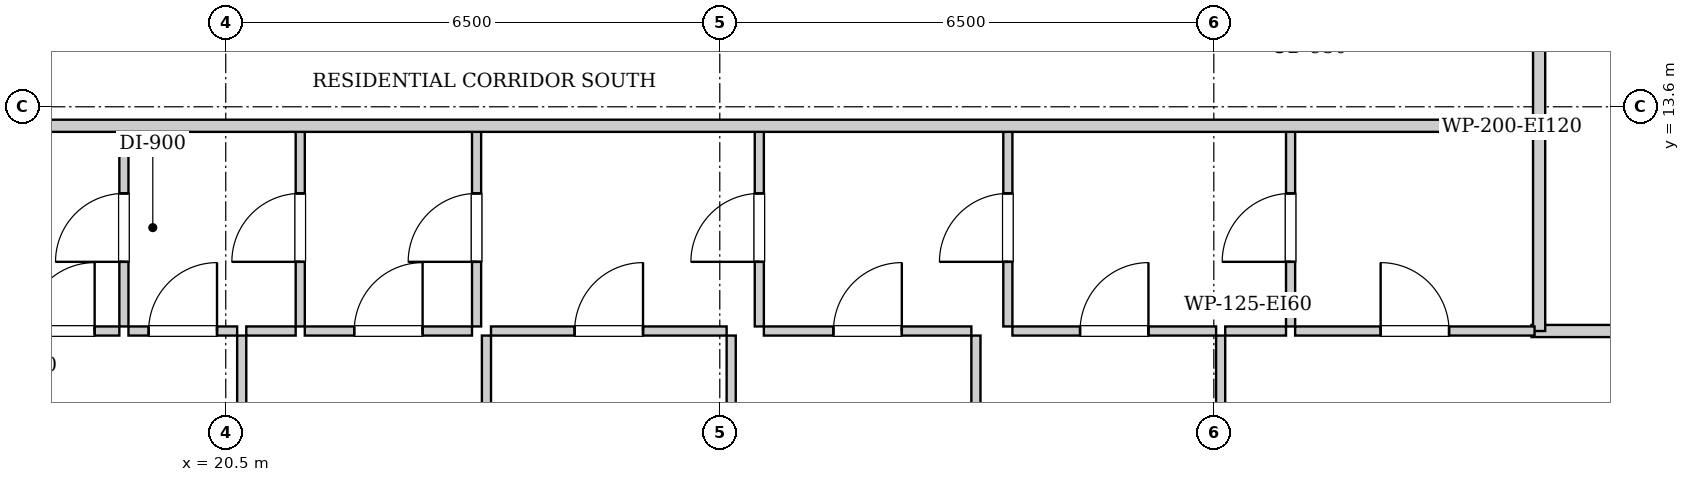
"""IFC4 building model, lengths in metres.
Left out: names, types, materials, properties, quantities, classifications, styles, units other than length and angle.
Written with IfcOpenShell. Run it as: python <this file> out.ifc"""

import sys

from ifc_helpers import new_model, si_unit, direction, frame, frame_2d, origin, place, context, subcontext, project, spatial, rectangle, extrude, element, fill, save


model = new_model("IFC4")
c1 = context("Model", 3, precision=1e-05, world=origin(), true_north=direction((0.0, 1.0)))
c2 = subcontext(c1, "Body", "Model", "MODEL_VIEW")
j1 = project(units=[si_unit("LENGTHUNIT", "METRE"), si_unit("PLANEANGLEUNIT", "RADIAN")], contexts=[c1])
p1 = place(None, origin())
s1 = spatial("IfcSite", under=j1, at=p1, CompositionType="ELEMENT")
p2 = place(p1, origin())
s2 = spatial("IfcBuilding", under=s1, at=p2, CompositionType="ELEMENT")
p3 = place(p2, frame((0.0, 0.0, 130.9)))
s3 = spatial("IfcBuildingStorey", under=s2, at=p3, CompositionType="ELEMENT", Elevation=130.9)
p4 = place(p3, frame((37.78, 13.35, 0.0), z_axis=(0.0, 0.0, 1.0), x_axis=(0.0, 1.0, 0.0)))
e1 = element("IfcWall", 1, at=p4, inside=s3, PredefinedType="PARTITIONING", context=c2, shape_type="SweptSolid", body=[
    extrude(rectangle(XDim=1.74, YDim=0.16, at=frame_2d((0.87, 0.0))), origin(), (0.0, 0.0, 1.0), 2.99),
])
p5 = place(p3, frame((37.68, 10.65, 0.0), z_axis=(0.0, 0.0, 1.0), x_axis=(1.0, 0.0, 0.0)))
e2 = element("IfcWall", 2, at=p5, inside=s3, PredefinedType="PARTITIONING", context=c2, shape_type="SweptSolid", body=[
    extrude(rectangle(XDim=2.34, YDim=0.16, at=frame_2d((1.17, 0.0))), origin(), (0.0, 0.0, 1.0), 2.99),
])
p6 = place(p3, frame((37.78, 10.65, 0.0), z_axis=(0.0, 0.0, 1.0), x_axis=(0.0, 1.0, 0.0)))
e3 = element("IfcWall", 3, at=p6, inside=s3, PredefinedType="PARTITIONING", context=c2, shape_type="SweptSolid", body=[
    extrude(rectangle(XDim=2.66, YDim=0.16, at=frame_2d((1.33, 0.0))), origin(), (0.0, 0.0, 1.0), 2.99),
])
p7 = place(p3, frame((19.16, 10.71, 0.0), z_axis=(0.0, 0.0, 1.0), x_axis=(0.0, 1.0, 0.0)))
e4 = element("IfcWall", 4, at=p7, inside=s3, PredefinedType="PARTITIONING", context=c2, shape_type="SweptSolid", body=[
    extrude(rectangle(XDim=2.6, YDim=0.12, at=frame_2d((1.3, 0.0))), origin(), (0.0, 0.0, 1.0), 2.99),
])
p8 = place(p7, frame((0.85, 0.0, 0.0)))
e5 = element("IfcOpeningElement", 5, at=p8, cuts=e4, PredefinedType="OPENING", context=c2, shape_type="SweptSolid", body=[
    extrude(rectangle(XDim=0.9, YDim=2.05, at=frame_2d((0.45, 1.025))), frame((0.0, 0.07, 0.0), z_axis=(0.0, -1.0, 0.0), x_axis=(1.0, 0.0, 0.0)), (0.0, 0.0, 1.0), 0.14),
])
p9 = place(p3, frame((17.55, 10.65, 0.0), z_axis=(0.0, 0.0, 1.0), x_axis=(1.0, 0.0, 0.0)))
e6 = element("IfcWall", 6, at=p9, inside=s3, PredefinedType="PARTITIONING", context=c2, shape_type="SweptSolid", body=[
    extrude(rectangle(XDim=1.55, YDim=0.12, at=frame_2d((0.775, 0.0))), origin(), (0.0, 0.0, 1.0), 2.99),
])
p10 = place(p9, frame((0.325, 0.0, 0.0)))
e7 = element("IfcOpeningElement", 7, at=p10, cuts=e6, PredefinedType="OPENING", context=c2, shape_type="SweptSolid", body=[
    extrude(rectangle(XDim=0.9, YDim=2.05, at=frame_2d((0.45, 1.025))), frame((0.0, 0.07, 0.0), z_axis=(0.0, -1.0, 0.0), x_axis=(1.0, 0.0, 0.0)), (0.0, 0.0, 1.0), 0.14),
])
p11 = place(p3, frame((21.48, 10.71, 0.0), z_axis=(0.0, 0.0, 1.0), x_axis=(0.0, 1.0, 0.0)))
e8 = element("IfcWall", 8, at=p11, inside=s3, PredefinedType="PARTITIONING", context=c2, shape_type="SweptSolid", body=[
    extrude(rectangle(XDim=2.6, YDim=0.12, at=frame_2d((1.3, 0.0))), origin(), (0.0, 0.0, 1.0), 2.99),
])
p12 = place(p11, frame((0.85, 0.0, 0.0)))
e9 = element("IfcOpeningElement", 9, at=p12, cuts=e8, PredefinedType="OPENING", context=c2, shape_type="SweptSolid", body=[
    extrude(rectangle(XDim=0.9, YDim=2.05, at=frame_2d((0.45, 1.025))), frame((0.0, 0.07, 0.0), z_axis=(0.0, -1.0, 0.0), x_axis=(1.0, 0.0, 0.0)), (0.0, 0.0, 1.0), 0.14),
])
p13 = place(p3, frame((19.22, 10.65, 0.0), z_axis=(0.0, 0.0, 1.0), x_axis=(1.0, 0.0, 0.0)))
e10 = element("IfcWall", 10, at=p13, inside=s3, PredefinedType="PARTITIONING", context=c2, shape_type="SweptSolid", body=[
    extrude(rectangle(XDim=1.43, YDim=0.12, at=frame_2d((0.715, 0.0))), origin(), (0.0, 0.0, 1.0), 2.99),
])
p14 = place(p13, frame((0.265, 0.0, 0.0)))
e11 = element("IfcOpeningElement", 11, at=p14, cuts=e10, PredefinedType="OPENING", context=c2, shape_type="SweptSolid", body=[
    extrude(rectangle(XDim=0.9, YDim=2.05, at=frame_2d((0.45, 1.025))), frame((0.0, 0.07, 0.0), z_axis=(0.0, -1.0, 0.0), x_axis=(1.0, 0.0, 0.0)), (0.0, 0.0, 1.0), 0.14),
])
p15 = place(p3, frame((20.77, 10.65, 0.0), z_axis=(0.0, 0.0, 1.0), x_axis=(1.0, 0.0, 0.0)))
e12 = element("IfcWall", 12, at=p15, inside=s3, PredefinedType="PARTITIONING", context=c2, shape_type="SweptSolid", body=[
    extrude(rectangle(XDim=0.65, YDim=0.12, at=frame_2d((0.325, 0.0))), origin(), (0.0, 0.0, 1.0), 2.99),
])
p16 = place(p3, frame((23.8, 10.71, 0.0), z_axis=(0.0, 0.0, 1.0), x_axis=(0.0, 1.0, 0.0)))
e13 = element("IfcWall", 13, at=p16, inside=s3, PredefinedType="PARTITIONING", context=c2, shape_type="SweptSolid", body=[
    extrude(rectangle(XDim=2.6, YDim=0.12, at=frame_2d((1.3, 0.0))), origin(), (0.0, 0.0, 1.0), 2.99),
])
p17 = place(p16, frame((0.85, 0.0, 0.0)))
e14 = element("IfcOpeningElement", 14, at=p17, cuts=e13, PredefinedType="OPENING", context=c2, shape_type="SweptSolid", body=[
    extrude(rectangle(XDim=0.9, YDim=2.05, at=frame_2d((0.45, 1.025))), frame((0.0, 0.07, 0.0), z_axis=(0.0, -1.0, 0.0), x_axis=(1.0, 0.0, 0.0)), (0.0, 0.0, 1.0), 0.14),
])
p18 = place(p3, frame((21.54, 10.65, 0.0), z_axis=(0.0, 0.0, 1.0), x_axis=(1.0, 0.0, 0.0)))
e15 = element("IfcWall", 15, at=p18, inside=s3, PredefinedType="PARTITIONING", context=c2, shape_type="SweptSolid", body=[
    extrude(rectangle(XDim=2.2, YDim=0.12, at=frame_2d((1.1, 0.0))), origin(), (0.0, 0.0, 1.0), 2.99),
])
p19 = place(p18, frame((0.65, 0.0, 0.0)))
e16 = element("IfcOpeningElement", 16, at=p19, cuts=e15, PredefinedType="OPENING", context=c2, shape_type="SweptSolid", body=[
    extrude(rectangle(XDim=0.9, YDim=2.05, at=frame_2d((0.45, 1.025))), frame((0.0, 0.07, 0.0), z_axis=(0.0, -1.0, 0.0), x_axis=(1.0, 0.0, 0.0)), (0.0, 0.0, 1.0), 0.14),
])
p20 = place(p3, frame((27.52, 10.71, 0.0), z_axis=(0.0, 0.0, 1.0), x_axis=(0.0, 1.0, 0.0)))
e17 = element("IfcWall", 17, at=p20, inside=s3, PredefinedType="PARTITIONING", context=c2, shape_type="SweptSolid", body=[
    extrude(rectangle(XDim=2.6, YDim=0.12, at=frame_2d((1.3, 0.0))), origin(), (0.0, 0.0, 1.0), 2.99),
])
p21 = place(p20, frame((0.85, 0.0, 0.0)))
e18 = element("IfcOpeningElement", 18, at=p21, cuts=e17, PredefinedType="OPENING", context=c2, shape_type="SweptSolid", body=[
    extrude(rectangle(XDim=0.9, YDim=2.05, at=frame_2d((0.45, 1.025))), frame((0.0, 0.07, 0.0), z_axis=(0.0, -1.0, 0.0), x_axis=(1.0, 0.0, 0.0)), (0.0, 0.0, 1.0), 0.14),
])
p22 = place(p3, frame((23.99, 10.65, 0.0), z_axis=(0.0, 0.0, 1.0), x_axis=(1.0, 0.0, 0.0)))
e19 = element("IfcWall", 19, at=p22, inside=s3, PredefinedType="PARTITIONING", context=c2, shape_type="SweptSolid", body=[
    extrude(rectangle(XDim=3.1, YDim=0.12, at=frame_2d((1.55, 0.0))), origin(), (0.0, 0.0, 1.0), 2.99),
])
p23 = place(p22, frame((1.1, 0.0, 0.0)))
e20 = element("IfcOpeningElement", 20, at=p23, cuts=e19, PredefinedType="OPENING", context=c2, shape_type="SweptSolid", body=[
    extrude(rectangle(XDim=0.9, YDim=2.05, at=frame_2d((0.45, 1.025))), frame((0.0, 0.07, 0.0), z_axis=(0.0, -1.0, 0.0), x_axis=(1.0, 0.0, 0.0)), (0.0, 0.0, 1.0), 0.14),
])
p24 = place(p3, frame((30.79, 10.71, 0.0), z_axis=(0.0, 0.0, 1.0), x_axis=(0.0, 1.0, 0.0)))
e21 = element("IfcWall", 21, at=p24, inside=s3, PredefinedType="PARTITIONING", context=c2, shape_type="SweptSolid", body=[
    extrude(rectangle(XDim=2.6, YDim=0.12, at=frame_2d((1.3, 0.0))), origin(), (0.0, 0.0, 1.0), 2.99),
])
p25 = place(p24, frame((0.85, 0.0, 0.0)))
e22 = element("IfcOpeningElement", 22, at=p25, cuts=e21, PredefinedType="OPENING", context=c2, shape_type="SweptSolid", body=[
    extrude(rectangle(XDim=0.9, YDim=2.05, at=frame_2d((0.45, 1.025))), frame((0.0, 0.07, 0.0), z_axis=(0.0, -1.0, 0.0), x_axis=(1.0, 0.0, 0.0)), (0.0, 0.0, 1.0), 0.14),
])
p26 = place(p3, frame((27.58, 10.65, 0.0), z_axis=(0.0, 0.0, 1.0), x_axis=(1.0, 0.0, 0.0)))
e23 = element("IfcWall", 23, at=p26, inside=s3, PredefinedType="PARTITIONING", context=c2, shape_type="SweptSolid", body=[
    extrude(rectangle(XDim=2.73, YDim=0.12, at=frame_2d((1.365, 0.0))), origin(), (0.0, 0.0, 1.0), 2.99),
])
p27 = place(p26, frame((0.915, 0.0, 0.0)))
e24 = element("IfcOpeningElement", 24, at=p27, cuts=e23, PredefinedType="OPENING", context=c2, shape_type="SweptSolid", body=[
    extrude(rectangle(XDim=0.9, YDim=2.05, at=frame_2d((0.45, 1.025))), frame((0.0, 0.07, 0.0), z_axis=(0.0, -1.0, 0.0), x_axis=(1.0, 0.0, 0.0)), (0.0, 0.0, 1.0), 0.14),
])
p28 = place(p3, frame((34.51, 10.71, 0.0), z_axis=(0.0, 0.0, 1.0), x_axis=(0.0, 1.0, 0.0)))
e25 = element("IfcWall", 25, at=p28, inside=s3, PredefinedType="PARTITIONING", context=c2, shape_type="SweptSolid", body=[
    extrude(rectangle(XDim=2.6, YDim=0.12, at=frame_2d((1.3, 0.0))), origin(), (0.0, 0.0, 1.0), 2.99),
])
p29 = place(p28, frame((0.85, 0.0, 0.0)))
e26 = element("IfcOpeningElement", 26, at=p29, cuts=e25, PredefinedType="OPENING", context=c2, shape_type="SweptSolid", body=[
    extrude(rectangle(XDim=0.9, YDim=2.05, at=frame_2d((0.45, 1.025))), frame((0.0, 0.07, 0.0), z_axis=(0.0, -1.0, 0.0), x_axis=(1.0, 0.0, 0.0)), (0.0, 0.0, 1.0), 0.14),
])
p30 = place(p3, frame((30.85, 10.65, 0.0), z_axis=(0.0, 0.0, 1.0), x_axis=(1.0, 0.0, 0.0)))
e27 = element("IfcWall", 27, at=p30, inside=s3, PredefinedType="PARTITIONING", context=c2, shape_type="SweptSolid", body=[
    extrude(rectangle(XDim=2.68, YDim=0.12, at=frame_2d((1.34, 0.0))), origin(), (0.0, 0.0, 1.0), 2.99),
])
p31 = place(p30, frame((0.89, 0.0, 0.0)))
e28 = element("IfcOpeningElement", 28, at=p31, cuts=e27, PredefinedType="OPENING", context=c2, shape_type="SweptSolid", body=[
    extrude(rectangle(XDim=0.9, YDim=2.05, at=frame_2d((0.45, 1.025))), frame((0.0, 0.07, 0.0), z_axis=(0.0, -1.0, 0.0), x_axis=(1.0, 0.0, 0.0)), (0.0, 0.0, 1.0), 0.14),
])
p32 = place(p3, frame((33.65, 10.65, 0.0), z_axis=(0.0, 0.0, 1.0), x_axis=(1.0, 0.0, 0.0)))
e29 = element("IfcWall", 29, at=p32, inside=s3, PredefinedType="PARTITIONING", context=c2, shape_type="SweptSolid", body=[
    extrude(rectangle(XDim=0.8, YDim=0.12, at=frame_2d((0.4, 0.0))), origin(), (0.0, 0.0, 1.0), 2.99),
])
p33 = place(p3, frame((34.57, 10.65, 0.0), z_axis=(0.0, 0.0, 1.0), x_axis=(1.0, 0.0, 0.0)))
e30 = element("IfcWall", 30, at=p33, inside=s3, PredefinedType="PARTITIONING", context=c2, shape_type="SweptSolid", body=[
    extrude(rectangle(XDim=3.15, YDim=0.12, at=frame_2d((1.575, 0.0))), origin(), (0.0, 0.0, 1.0), 2.99),
])
p34 = place(p33, frame((1.125, 0.0, 0.0)))
e31 = element("IfcOpeningElement", 31, at=p34, cuts=e30, PredefinedType="OPENING", context=c2, shape_type="SweptSolid", body=[
    extrude(rectangle(XDim=0.9, YDim=2.05, at=frame_2d((0.45, 1.025))), frame((0.0, 0.07, 0.0), z_axis=(0.0, -1.0, 0.0), x_axis=(1.0, 0.0, 0.0)), (0.0, 0.0, 1.0), 0.14),
])
p35 = place(p3, frame((20.71, 4.08, 0.0), z_axis=(0.0, 0.0, 1.0), x_axis=(0.0, 1.0, 0.0)))
e32 = element("IfcWall", 32, at=p35, inside=s3, PredefinedType="PARTITIONING", context=c2, shape_type="SweptSolid", body=[
    extrude(rectangle(XDim=6.51, YDim=0.12, at=frame_2d((3.255, 0.0))), origin(), (0.0, 0.0, 1.0), 2.99),
])
p36 = place(p35, frame((2.79, 0.0, 0.0)))
e33 = element("IfcOpeningElement", 33, at=p36, cuts=e32, PredefinedType="OPENING", context=c2, shape_type="SweptSolid", body=[
    extrude(rectangle(XDim=0.9, YDim=2.05, at=frame_2d((0.45, 1.025))), frame((0.0, 0.07, 0.0), z_axis=(0.0, -1.0, 0.0), x_axis=(1.0, 0.0, 0.0)), (0.0, 0.0, 1.0), 0.14),
])
p37 = place(p3, frame((23.93, 4.08, 0.0), z_axis=(0.0, 0.0, 1.0), x_axis=(0.0, 1.0, 0.0)))
e34 = element("IfcWall", 34, at=p37, inside=s3, PredefinedType="PARTITIONING", context=c2, shape_type="SweptSolid", body=[
    extrude(rectangle(XDim=6.51, YDim=0.12, at=frame_2d((3.255, 0.0))), origin(), (0.0, 0.0, 1.0), 2.99),
])
p38 = place(p37, frame((2.79, 0.0, 0.0)))
e35 = element("IfcOpeningElement", 35, at=p38, cuts=e34, PredefinedType="OPENING", context=c2, shape_type="SweptSolid", body=[
    extrude(rectangle(XDim=0.9, YDim=2.05, at=frame_2d((0.45, 1.025))), frame((0.0, 0.07, 0.0), z_axis=(0.0, -1.0, 0.0), x_axis=(1.0, 0.0, 0.0)), (0.0, 0.0, 1.0), 0.14),
])
p39 = place(p3, frame((27.15, 4.08, 0.0), z_axis=(0.0, 0.0, 1.0), x_axis=(0.0, 1.0, 0.0)))
e36 = element("IfcWall", 36, at=p39, inside=s3, PredefinedType="PARTITIONING", context=c2, shape_type="SweptSolid", body=[
    extrude(rectangle(XDim=6.51, YDim=0.12, at=frame_2d((3.255, 0.0))), origin(), (0.0, 0.0, 1.0), 2.99),
])
p40 = place(p39, frame((2.79, 0.0, 0.0)))
e37 = element("IfcOpeningElement", 37, at=p40, cuts=e36, PredefinedType="OPENING", context=c2, shape_type="SweptSolid", body=[
    extrude(rectangle(XDim=0.9, YDim=2.05, at=frame_2d((0.45, 1.025))), frame((0.0, 0.07, 0.0), z_axis=(0.0, -1.0, 0.0), x_axis=(1.0, 0.0, 0.0)), (0.0, 0.0, 1.0), 0.14),
])
p41 = place(p3, frame((30.37, 4.08, 0.0), z_axis=(0.0, 0.0, 1.0), x_axis=(0.0, 1.0, 0.0)))
e38 = element("IfcWall", 38, at=p41, inside=s3, PredefinedType="PARTITIONING", context=c2, shape_type="SweptSolid", body=[
    extrude(rectangle(XDim=6.51, YDim=0.12, at=frame_2d((3.255, 0.0))), origin(), (0.0, 0.0, 1.0), 2.99),
])
p42 = place(p41, frame((2.79, 0.0, 0.0)))
e39 = element("IfcOpeningElement", 39, at=p42, cuts=e38, PredefinedType="OPENING", context=c2, shape_type="SweptSolid", body=[
    extrude(rectangle(XDim=0.9, YDim=2.05, at=frame_2d((0.45, 1.025))), frame((0.0, 0.07, 0.0), z_axis=(0.0, -1.0, 0.0), x_axis=(1.0, 0.0, 0.0)), (0.0, 0.0, 1.0), 0.14),
])
p43 = place(p3, frame((33.59, 6.23, 0.0), z_axis=(0.0, 0.0, 1.0), x_axis=(0.0, 1.0, 0.0)))
e40 = element("IfcWall", 40, at=p43, inside=s3, PredefinedType="PARTITIONING", context=c2, shape_type="SweptSolid", body=[
    extrude(rectangle(XDim=4.36, YDim=0.12, at=frame_2d((2.18, 0.0))), origin(), (0.0, 0.0, 1.0), 2.99),
])
p44 = place(p43, frame((1.73, 0.0, 0.0)))
e41 = element("IfcOpeningElement", 41, at=p44, cuts=e40, PredefinedType="OPENING", context=c2, shape_type="SweptSolid", body=[
    extrude(rectangle(XDim=0.9, YDim=2.05, at=frame_2d((0.45, 1.025))), frame((0.0, 0.07, 0.0), z_axis=(0.0, -1.0, 0.0), x_axis=(1.0, 0.0, 0.0)), (0.0, 0.0, 1.0), 0.14),
])
p45 = place(p3, frame((10.05, 13.35, 0.0), z_axis=(0.0, 0.0, 1.0), x_axis=(1.0, 0.0, 0.0)))
e42 = element("IfcWall", 42, at=p45, inside=s3, PredefinedType="PARTITIONING", context=c2, shape_type="SweptSolid", body=[
    extrude(rectangle(XDim=27.7, YDim=0.16, at=frame_2d((13.85, 0.0))), origin(), (0.0, 0.0, 1.0), 2.99),
])
p46 = place(p45, frame((4.165, 0.0, 0.0)))
e43 = element("IfcOpeningElement", 43, at=p46, cuts=e42, PredefinedType="OPENING", context=c2, shape_type="SweptSolid", body=[
    extrude(rectangle(XDim=0.95, YDim=2.1, at=frame_2d((0.475, 1.05))), frame((0.0, 0.09, 0.0), z_axis=(0.0, -1.0, 0.0), x_axis=(1.0, 0.0, 0.0)), (0.0, 0.0, 1.0), 0.18),
])
p47 = place(p8, origin())
e44 = element("IfcDoor", 44, at=p47, inside=s3, OperationType="SINGLE_SWING_LEFT", PredefinedType="DOOR", context=c2, shape_type="SweptSolid", body=[
    extrude(rectangle(XDim=0.9, YDim=2.05, at=frame_2d((0.45, 1.025))), frame((0.0, 0.025, 0.0), z_axis=(0.0, -1.0, 0.0), x_axis=(1.0, 0.0, 0.0)), (0.0, 0.0, 1.0), 0.05),
])
fill(e5, e44)
p48 = place(p10, origin())
e45 = element("IfcDoor", 45, at=p48, inside=s3, OperationType="SINGLE_SWING_RIGHT", PredefinedType="DOOR", context=c2, shape_type="SweptSolid", body=[
    extrude(rectangle(XDim=0.9, YDim=2.05, at=frame_2d((0.45, 1.025))), frame((0.0, 0.025, 0.0), z_axis=(0.0, -1.0, 0.0), x_axis=(1.0, 0.0, 0.0)), (0.0, 0.0, 1.0), 0.05),
])
fill(e7, e45)
p49 = place(p12, origin())
e46 = element("IfcDoor", 46, at=p49, inside=s3, OperationType="SINGLE_SWING_LEFT", PredefinedType="DOOR", context=c2, shape_type="SweptSolid", body=[
    extrude(rectangle(XDim=0.9, YDim=2.05, at=frame_2d((0.45, 1.025))), frame((0.0, 0.025, 0.0), z_axis=(0.0, -1.0, 0.0), x_axis=(1.0, 0.0, 0.0)), (0.0, 0.0, 1.0), 0.05),
])
fill(e9, e46)
p50 = place(p14, origin())
e47 = element("IfcDoor", 47, at=p50, inside=s3, OperationType="SINGLE_SWING_RIGHT", PredefinedType="DOOR", context=c2, shape_type="SweptSolid", body=[
    extrude(rectangle(XDim=0.9, YDim=2.05, at=frame_2d((0.45, 1.025))), frame((0.0, 0.025, 0.0), z_axis=(0.0, -1.0, 0.0), x_axis=(1.0, 0.0, 0.0)), (0.0, 0.0, 1.0), 0.05),
])
fill(e11, e47)
p51 = place(p17, origin())
e48 = element("IfcDoor", 48, at=p51, inside=s3, OperationType="SINGLE_SWING_LEFT", PredefinedType="DOOR", context=c2, shape_type="SweptSolid", body=[
    extrude(rectangle(XDim=0.9, YDim=2.05, at=frame_2d((0.45, 1.025))), frame((0.0, 0.025, 0.0), z_axis=(0.0, -1.0, 0.0), x_axis=(1.0, 0.0, 0.0)), (0.0, 0.0, 1.0), 0.05),
])
fill(e14, e48)
p52 = place(p19, origin())
e49 = element("IfcDoor", 49, at=p52, inside=s3, OperationType="SINGLE_SWING_RIGHT", PredefinedType="DOOR", context=c2, shape_type="SweptSolid", body=[
    extrude(rectangle(XDim=0.9, YDim=2.05, at=frame_2d((0.45, 1.025))), frame((0.0, 0.025, 0.0), z_axis=(0.0, -1.0, 0.0), x_axis=(1.0, 0.0, 0.0)), (0.0, 0.0, 1.0), 0.05),
])
fill(e16, e49)
p53 = place(p21, origin())
e50 = element("IfcDoor", 50, at=p53, inside=s3, OperationType="SINGLE_SWING_LEFT", PredefinedType="DOOR", context=c2, shape_type="SweptSolid", body=[
    extrude(rectangle(XDim=0.9, YDim=2.05, at=frame_2d((0.45, 1.025))), frame((0.0, 0.025, 0.0), z_axis=(0.0, -1.0, 0.0), x_axis=(1.0, 0.0, 0.0)), (0.0, 0.0, 1.0), 0.05),
])
fill(e18, e50)
p54 = place(p23, origin())
e51 = element("IfcDoor", 51, at=p54, inside=s3, OperationType="SINGLE_SWING_RIGHT", PredefinedType="DOOR", context=c2, shape_type="SweptSolid", body=[
    extrude(rectangle(XDim=0.9, YDim=2.05, at=frame_2d((0.45, 1.025))), frame((0.0, 0.025, 0.0), z_axis=(0.0, -1.0, 0.0), x_axis=(1.0, 0.0, 0.0)), (0.0, 0.0, 1.0), 0.05),
])
fill(e20, e51)
p55 = place(p25, origin())
e52 = element("IfcDoor", 52, at=p55, inside=s3, OperationType="SINGLE_SWING_LEFT", PredefinedType="DOOR", context=c2, shape_type="SweptSolid", body=[
    extrude(rectangle(XDim=0.9, YDim=2.05, at=frame_2d((0.45, 1.025))), frame((0.0, 0.025, 0.0), z_axis=(0.0, -1.0, 0.0), x_axis=(1.0, 0.0, 0.0)), (0.0, 0.0, 1.0), 0.05),
])
fill(e22, e52)
p56 = place(p27, origin())
e53 = element("IfcDoor", 53, at=p56, inside=s3, OperationType="SINGLE_SWING_RIGHT", PredefinedType="DOOR", context=c2, shape_type="SweptSolid", body=[
    extrude(rectangle(XDim=0.9, YDim=2.05, at=frame_2d((0.45, 1.025))), frame((0.0, 0.025, 0.0), z_axis=(0.0, -1.0, 0.0), x_axis=(1.0, 0.0, 0.0)), (0.0, 0.0, 1.0), 0.05),
])
fill(e24, e53)
p57 = place(p29, origin())
e54 = element("IfcDoor", 54, at=p57, inside=s3, OperationType="SINGLE_SWING_LEFT", PredefinedType="DOOR", context=c2, shape_type="SweptSolid", body=[
    extrude(rectangle(XDim=0.9, YDim=2.05, at=frame_2d((0.45, 1.025))), frame((0.0, 0.025, 0.0), z_axis=(0.0, -1.0, 0.0), x_axis=(1.0, 0.0, 0.0)), (0.0, 0.0, 1.0), 0.05),
])
fill(e26, e54)
p58 = place(p31, origin())
e55 = element("IfcDoor", 55, at=p58, inside=s3, OperationType="SINGLE_SWING_RIGHT", PredefinedType="DOOR", context=c2, shape_type="SweptSolid", body=[
    extrude(rectangle(XDim=0.9, YDim=2.05, at=frame_2d((0.45, 1.025))), frame((0.0, 0.025, 0.0), z_axis=(0.0, -1.0, 0.0), x_axis=(1.0, 0.0, 0.0)), (0.0, 0.0, 1.0), 0.05),
])
fill(e28, e55)
p59 = place(p34, origin())
e56 = element("IfcDoor", 56, at=p59, inside=s3, OperationType="SINGLE_SWING_LEFT", PredefinedType="DOOR", context=c2, shape_type="SweptSolid", body=[
    extrude(rectangle(XDim=0.9, YDim=2.05, at=frame_2d((0.45, 1.025))), frame((0.0, 0.025, 0.0), z_axis=(0.0, -1.0, 0.0), x_axis=(1.0, 0.0, 0.0)), (0.0, 0.0, 1.0), 0.05),
])
fill(e31, e56)
save(model, sys.argv[1])
